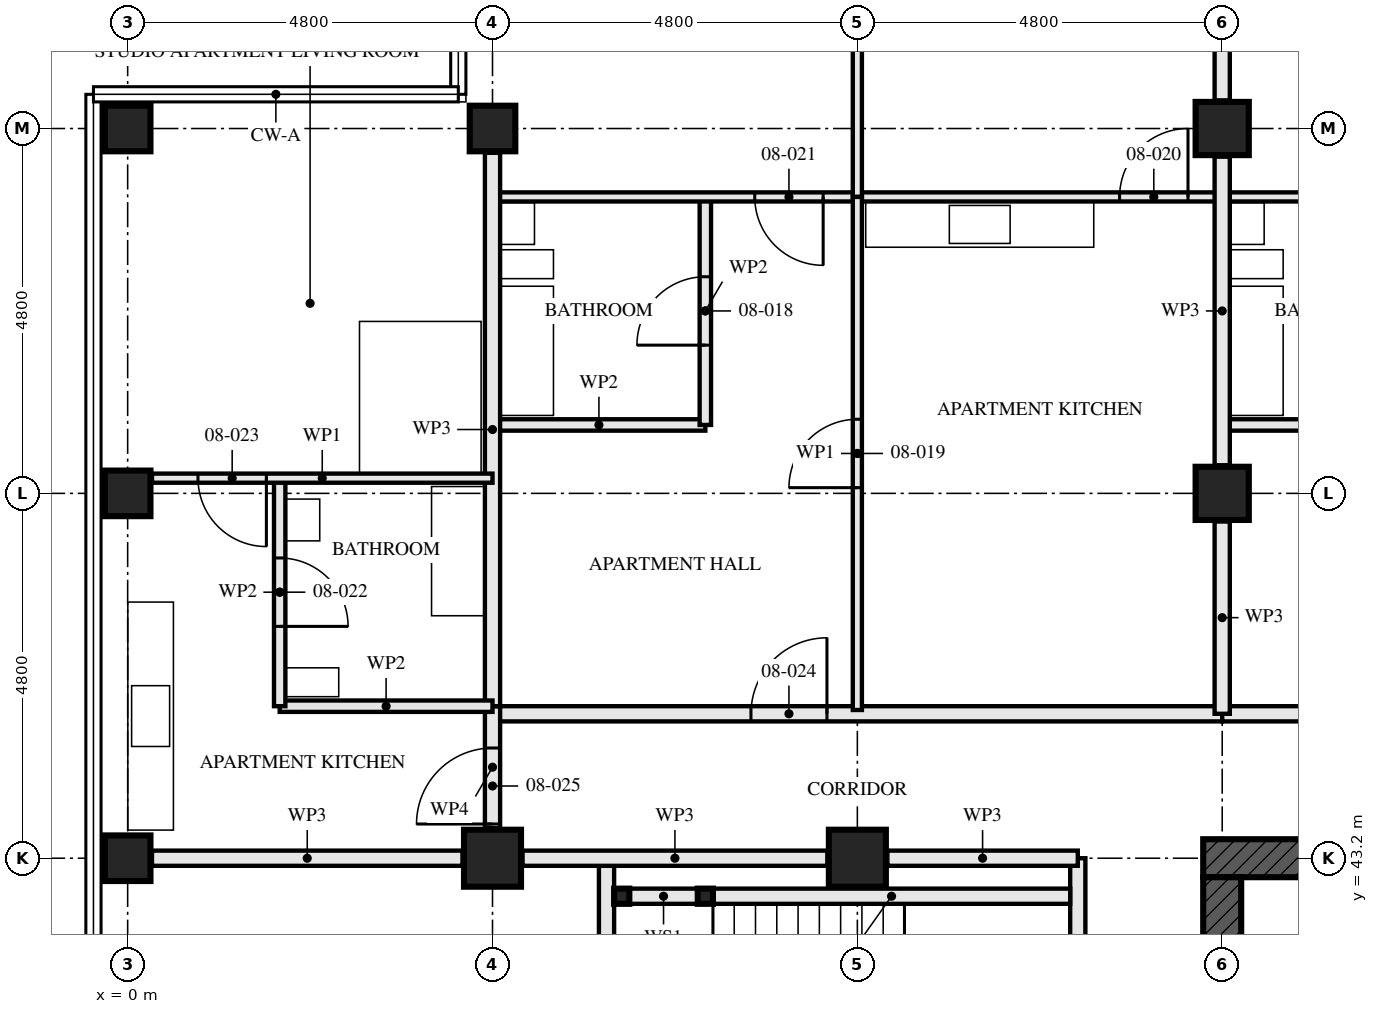
"""IFC4 building model, lengths in metres.
Left out: names, types, materials, properties, quantities, classifications, styles, units other than length and angle.
Written with IfcOpenShell. Run it as: python <this file> out.ifc"""

import sys

from ifc_helpers import new_model, si_unit, direction, frame, frame_2d, origin, origin_2d, place, context, subcontext, project, spatial, rectangle, hollow_rectangle, extrude, element, fill, save


model = new_model("IFC4")
c1 = context("Model", 3, precision=1e-05, world=origin(), true_north=direction((0.0, 1.0)))
c2 = subcontext(c1, "Body", "Model", "MODEL_VIEW")
j1 = project(units=[si_unit("LENGTHUNIT", "METRE"), si_unit("PLANEANGLEUNIT", "RADIAN")], contexts=[c1])
p1 = place(None, origin())
s1 = spatial("IfcSite", under=j1, at=p1, CompositionType="ELEMENT")
p2 = place(p1, origin())
s2 = spatial("IfcBuilding", under=s1, at=p2, CompositionType="ELEMENT")
p3 = place(p2, frame((0.0, 0.0, 34.0)))
s3 = spatial("IfcBuildingStorey", under=s2, at=p3, CompositionType="ELEMENT", Elevation=34.0)
for number, where, z_axis, x_axis in (
    (1, (0.0, 43.2, 0.0), (0.0, 0.0, 1.0), (0.0, 1.0, 0.0)),
    (2, (0.0, 48.0, 0.0), (0.0, 0.0, 1.0), (1.0, 0.0, 0.0)),
    (3, (0.0, 52.8, 0.0), (0.0, 0.0, 1.0), (0.0, 1.0, 0.0)),
):
    element("IfcColumn", number, at=place(p3, frame(where, z_axis=z_axis, x_axis=x_axis)), inside=s3, PredefinedType="COLUMN", context=c2, shape_type="SweptSolid", body=[
        extrude(hollow_rectangle(XDim=0.6, YDim=0.6, WallThickness=0.08, at=origin_2d()), origin(), (0.0, 0.0, 1.0), 3.5),
    ])
p4 = place(p3, frame((4.8, 43.2, 0.0), z_axis=(0.0, 0.0, 1.0), x_axis=(0.0, 1.0, 0.0)))
e4 = element("IfcColumn", 4, at=p4, inside=s3, PredefinedType="COLUMN", context=c2, shape_type="SweptSolid", body=[
    extrude(hollow_rectangle(XDim=0.75, YDim=0.75, WallThickness=0.08, at=origin_2d()), origin(), (0.0, 0.0, 1.0), 3.5),
])
p5 = place(p3, frame((4.8, 52.8, 0.0), z_axis=(0.0, 0.0, 1.0), x_axis=(0.0, 1.0, 0.0)))
e5 = element("IfcColumn", 5, at=p5, inside=s3, PredefinedType="COLUMN", context=c2, shape_type="SweptSolid", body=[
    extrude(hollow_rectangle(XDim=0.6, YDim=0.6, WallThickness=0.08, at=origin_2d()), origin(), (0.0, 0.0, 1.0), 3.5),
])
p6 = place(p3, frame((9.6, 43.2, 0.0), z_axis=(0.0, 0.0, 1.0), x_axis=(0.0, 1.0, 0.0)))
e6 = element("IfcColumn", 6, at=p6, inside=s3, PredefinedType="COLUMN", context=c2, shape_type="SweptSolid", body=[
    extrude(hollow_rectangle(XDim=0.75, YDim=0.75, WallThickness=0.08, at=origin_2d()), origin(), (0.0, 0.0, 1.0), 3.5),
])
for number, where, z_axis, x_axis in (
    (7, (14.4, 48.0, 0.0), (0.0, 0.0, 1.0), (1.0, 0.0, 0.0)),
    (8, (14.4, 52.8, 0.0), (0.0, 0.0, 1.0), (1.0, 0.0, 0.0)),
):
    element("IfcColumn", number, at=place(p3, frame(where, z_axis=z_axis, x_axis=x_axis)), inside=s3, PredefinedType="COLUMN", context=c2, shape_type="SweptSolid", body=[
        extrude(hollow_rectangle(XDim=0.7, YDim=0.7, WallThickness=0.06, at=origin_2d()), origin(), (0.0, 0.0, 1.0), 3.5),
    ])
p7 = place(p3, frame((29.05, 43.2, -0.17), z_axis=(0.0, 0.0, 1.0), x_axis=(-1.0, 0.0, 0.0)))
e9 = element("IfcWall", 9, at=p7, inside=s3, PredefinedType="SHEAR", context=c2, shape_type="SweptSolid", body=[
    extrude(rectangle(XDim=14.9, YDim=0.5, at=frame_2d((7.45, 0.0))), origin(), (0.0, 0.0, 1.0), 3.5),
])
p8 = place(p7, frame((6.85, 0.0, 0.17)))
e10 = element("IfcOpeningElement", 10, at=p8, cuts=e9, PredefinedType="OPENING", context=c2, shape_type="SweptSolid", body=[
    extrude(rectangle(XDim=1.2, YDim=2.1, at=frame_2d((0.6, 1.05))), frame((0.0, 0.26, 0.0), z_axis=(0.0, -1.0, 0.0), x_axis=(1.0, 0.0, 0.0)), (0.0, 0.0, 1.0), 0.521),
])
p9 = place(p3, frame((14.4, 42.95, -0.17), z_axis=(0.0, 0.0, 1.0), x_axis=(0.0, -1.0, 0.0)))
e11 = element("IfcWall", 11, at=p9, inside=s3, PredefinedType="SHEAR", context=c2, shape_type="SweptSolid", body=[
    extrude(rectangle(XDim=13.9, YDim=0.5, at=frame_2d((6.95, 0.0))), origin(), (0.0, 0.0, 1.0), 3.5),
])
p10 = place(p9, frame((6.35, 0.0, 0.17)))
e12 = element("IfcOpeningElement", 12, at=p10, cuts=e11, PredefinedType="OPENING", context=c2, shape_type="SweptSolid", body=[
    extrude(rectangle(XDim=1.2, YDim=2.1, at=frame_2d((0.6, 1.05))), frame((0.0, 0.26, 0.0), z_axis=(0.0, -1.0, 0.0), x_axis=(1.0, 0.0, 0.0)), (0.0, 0.0, 1.0), 0.521),
])
for number, where, z_axis, x_axis in (
    (13, (6.5, 42.7, 0.0), (0.0, 0.0, 1.0), (1.0, 0.0, 0.0)),
    (14, (7.6, 42.7, 0.0), (0.0, 0.0, 1.0), (1.0, 0.0, 0.0)),
):
    element("IfcColumn", number, at=place(p3, frame(where, z_axis=z_axis, x_axis=x_axis)), inside=s3, PredefinedType="COLUMN", context=c2, shape_type="SweptSolid", body=[
        extrude(hollow_rectangle(XDim=0.2, YDim=0.2, WallThickness=0.008, at=origin_2d()), origin(), (0.0, 0.0, 1.0), 3.33),
    ])
p11 = place(p3, frame((6.6, 42.7, 0.0), z_axis=(0.0, 0.0, 1.0), x_axis=(1.0, 0.0, 0.0)))
e15 = element("IfcWall", 15, at=p11, inside=s3, PredefinedType="SOLIDWALL", context=c2, shape_type="SweptSolid", body=[
    extrude(rectangle(XDim=0.9, YDim=0.2, at=frame_2d((0.45, 0.0))), origin(), (0.0, 0.0, 1.0), 2.99),
])
p12 = place(p3, frame((7.7, 42.7, 0.0), z_axis=(0.0, 0.0, 1.0), x_axis=(1.0, 0.0, 0.0)))
e16 = element("IfcWall", 16, at=p12, inside=s3, PredefinedType="SOLIDWALL", context=c2, shape_type="SweptSolid", body=[
    extrude(rectangle(XDim=4.7, YDim=0.2, at=frame_2d((2.35, 0.0))), origin(), (0.0, 0.0, 1.0), 2.99),
])
p13 = place(p3, frame((6.3, 43.1, 0.0), z_axis=(0.0, 0.0, 1.0), x_axis=(0.0, -1.0, 0.0)))
e17 = element("IfcWall", 17, at=p13, inside=s3, PredefinedType="SOLIDWALL", context=c2, shape_type="SweptSolid", body=[
    extrude(rectangle(XDim=3.3, YDim=0.2, at=frame_2d((1.65, 0.0))), origin(), (0.0, 0.0, 1.0), 3.33),
])
p14 = place(p3, frame((12.5, 43.2, 0.0), z_axis=(0.0, 0.0, 1.0), x_axis=(0.0, -1.0, 0.0)))
e18 = element("IfcWall", 18, at=p14, inside=s3, PredefinedType="PARTITIONING", context=c2, shape_type="SweptSolid", body=[
    extrude(rectangle(XDim=14.4, YDim=0.2, at=frame_2d((7.2, 0.0))), origin(), (0.0, 0.0, 1.0), 2.55),
])
p15 = place(p14, frame((1.4, 0.0, 0.0)))
e19 = element("IfcOpeningElement", 19, at=p15, cuts=e18, PredefinedType="OPENING", context=c2, shape_type="SweptSolid", body=[
    extrude(rectangle(XDim=1.0, YDim=2.1, at=frame_2d((0.5, 1.05))), frame((0.0, 0.111, 0.0), z_axis=(0.0, -1.0, 0.0), x_axis=(1.0, 0.0, 0.0)), (0.0, 0.0, 1.0), 0.221),
])
p16 = place(p14, frame((5.2, 0.0, 0.0)))
e20 = element("IfcOpeningElement", 20, at=p16, cuts=e18, PredefinedType="OPENING", context=c2, shape_type="SweptSolid", body=[
    extrude(rectangle(XDim=1.0, YDim=2.1, at=frame_2d((0.5, 1.05))), frame((0.0, 0.111, 0.0), z_axis=(0.0, -1.0, 0.0), x_axis=(1.0, 0.0, 0.0)), (0.0, 0.0, 1.0), 0.221),
])
p17 = place(p14, frame((10.0, 0.0, 0.0)))
e21 = element("IfcOpeningElement", 21, at=p17, cuts=e18, PredefinedType="OPENING", context=c2, shape_type="SweptSolid", body=[
    extrude(rectangle(XDim=1.0, YDim=2.1, at=frame_2d((0.5, 1.05))), frame((0.0, 0.111, 0.0), z_axis=(0.0, -1.0, 0.0), x_axis=(1.0, 0.0, 0.0)), (0.0, 0.0, 1.0), 0.221),
])
p18 = place(p3, frame((7.6, 51.9, 0.0), z_axis=(0.0, 0.0, 1.0), x_axis=(0.0, -1.0, 0.0)))
e22 = element("IfcWall", 22, at=p18, inside=s3, PredefinedType="PARTITIONING", context=c2, shape_type="SweptSolid", body=[
    extrude(rectangle(XDim=3.0, YDim=0.15, at=frame_2d((1.5, 0.0))), origin(), (0.0, 0.0, 1.0), 3.33),
])
p19 = place(p18, frame((1.05, 0.0, 0.0)))
e23 = element("IfcOpeningElement", 23, at=p19, cuts=e22, PredefinedType="OPENING", context=c2, shape_type="SweptSolid", body=[
    extrude(rectangle(XDim=0.9, YDim=2.1, at=frame_2d((0.45, 1.05))), frame((0.0, 0.085, 0.0), z_axis=(0.0, -1.0, 0.0), x_axis=(1.0, 0.0, 0.0)), (0.0, 0.0, 1.0), 0.171),
])
p20 = place(p3, frame((7.6, 48.9, 0.0), z_axis=(0.0, 0.0, 1.0), x_axis=(-1.0, 0.0, 0.0)))
e24 = element("IfcWall", 24, at=p20, inside=s3, PredefinedType="PARTITIONING", context=c2, shape_type="SweptSolid", body=[
    extrude(rectangle(XDim=2.8, YDim=0.15, at=frame_2d((1.4, 0.0))), origin(), (0.0, 0.0, 1.0), 3.33),
])
p21 = place(p3, frame((9.6, 51.9, 0.0), z_axis=(0.0, 0.0, 1.0), x_axis=(0.0, -1.0, 0.0)))
e25 = element("IfcWall", 25, at=p21, inside=s3, PredefinedType="PARTITIONING", context=c2, shape_type="SweptSolid", body=[
    extrude(rectangle(XDim=6.75, YDim=0.12, at=frame_2d((3.375, 0.0))), origin(), (0.0, 0.0, 1.0), 2.55),
])
p22 = place(p21, frame((2.925, 0.0, 0.0)))
e26 = element("IfcOpeningElement", 26, at=p22, cuts=e25, PredefinedType="OPENING", context=c2, shape_type="SweptSolid", body=[
    extrude(rectangle(XDim=0.9, YDim=2.1, at=frame_2d((0.45, 1.05))), frame((0.0, 0.071, 0.0), z_axis=(0.0, -1.0, 0.0), x_axis=(1.0, 0.0, 0.0)), (0.0, 0.0, 1.0), 0.141),
])
p23 = place(p3, frame((14.4, 51.9, 0.0), z_axis=(0.0, 0.0, 1.0), x_axis=(-1.0, 0.0, 0.0)))
e27 = element("IfcWall", 27, at=p23, inside=s3, PredefinedType="PARTITIONING", context=c2, shape_type="SweptSolid", body=[
    extrude(rectangle(XDim=4.8, YDim=0.12, at=frame_2d((2.4, 0.0))), origin(), (0.0, 0.0, 1.0), 3.33),
])
p24 = place(p23, frame((0.45, 0.0, 0.0)))
e28 = element("IfcOpeningElement", 28, at=p24, cuts=e27, PredefinedType="OPENING", context=c2, shape_type="SweptSolid", body=[
    extrude(rectangle(XDim=0.9, YDim=2.1, at=frame_2d((0.45, 1.05))), frame((0.0, 0.071, 0.0), z_axis=(0.0, -1.0, 0.0), x_axis=(1.0, 0.0, 0.0)), (0.0, 0.0, 1.0), 0.141),
])
p25 = place(p3, frame((9.6, 51.9, 0.0), z_axis=(0.0, 0.0, 1.0), x_axis=(-1.0, 0.0, 0.0)))
e29 = element("IfcWall", 29, at=p25, inside=s3, PredefinedType="PARTITIONING", context=c2, shape_type="SweptSolid", body=[
    extrude(rectangle(XDim=4.8, YDim=0.12, at=frame_2d((2.4, 0.0))), origin(), (0.0, 0.0, 1.0), 3.33),
])
p26 = place(p25, frame((0.45, 0.0, 0.0)))
e30 = element("IfcOpeningElement", 30, at=p26, cuts=e29, PredefinedType="OPENING", context=c2, shape_type="SweptSolid", body=[
    extrude(rectangle(XDim=0.9, YDim=2.1, at=frame_2d((0.45, 1.05))), frame((0.0, 0.071, 0.0), z_axis=(0.0, -1.0, 0.0), x_axis=(1.0, 0.0, 0.0)), (0.0, 0.0, 1.0), 0.141),
])
p27 = place(p3, frame((9.6, 57.28, 0.0), z_axis=(0.0, 0.0, 1.0), x_axis=(0.0, -1.0, 0.0)))
e31 = element("IfcWall", 31, at=p27, inside=s3, PredefinedType="PARTITIONING", context=c2, shape_type="SweptSolid", body=[
    extrude(rectangle(XDim=5.38, YDim=0.12, at=frame_2d((2.69, 0.0))), origin(), (0.0, 0.0, 1.0), 2.55),
])
p28 = place(p3, frame((4.8, 52.48, 0.0), z_axis=(0.0, 0.0, 1.0), x_axis=(0.0, -1.0, 0.0)))
e32 = element("IfcWall", 32, at=p28, inside=s3, PredefinedType="PARTITIONING", context=c2, shape_type="SweptSolid", body=[
    extrude(rectangle(XDim=7.28, YDim=0.2, at=frame_2d((3.64, 0.0))), origin(), (0.0, 0.0, 1.0), 2.55),
])
p29 = place(p3, frame((2.0, 48.2, 0.0), z_axis=(0.0, 0.0, 1.0), x_axis=(0.0, -1.0, 0.0)))
e33 = element("IfcWall", 33, at=p29, inside=s3, PredefinedType="PARTITIONING", context=c2, shape_type="SweptSolid", body=[
    extrude(rectangle(XDim=3.0, YDim=0.15, at=frame_2d((1.5, 0.0))), origin(), (0.0, 0.0, 1.0), 2.55),
])
p30 = place(p29, frame((1.05, 0.0, 0.0)))
e34 = element("IfcOpeningElement", 34, at=p30, cuts=e33, PredefinedType="OPENING", context=c2, shape_type="SweptSolid", body=[
    extrude(rectangle(XDim=0.9, YDim=2.1, at=frame_2d((0.45, 1.05))), frame((0.0, 0.085, 0.0), z_axis=(0.0, -1.0, 0.0), x_axis=(1.0, 0.0, 0.0)), (0.0, 0.0, 1.0), 0.171),
])
p31 = place(p3, frame((4.8, 45.2, 0.0), z_axis=(0.0, 0.0, 1.0), x_axis=(-1.0, 0.0, 0.0)))
e35 = element("IfcWall", 35, at=p31, inside=s3, PredefinedType="PARTITIONING", context=c2, shape_type="SweptSolid", body=[
    extrude(rectangle(XDim=2.8, YDim=0.15, at=frame_2d((1.4, 0.0))), origin(), (0.0, 0.0, 1.0), 3.33),
])
p32 = place(p3, frame((4.8, 48.2, 0.0), z_axis=(0.0, 0.0, 1.0), x_axis=(-1.0, 0.0, 0.0)))
e36 = element("IfcWall", 36, at=p32, inside=s3, PredefinedType="PARTITIONING", context=c2, shape_type="SweptSolid", body=[
    extrude(rectangle(XDim=4.48, YDim=0.12, at=frame_2d((2.24, 0.0))), origin(), (0.0, 0.0, 1.0), 3.33),
])
p33 = place(p32, frame((2.975, 0.0, 0.0)))
e37 = element("IfcOpeningElement", 37, at=p33, cuts=e36, PredefinedType="OPENING", context=c2, shape_type="SweptSolid", body=[
    extrude(rectangle(XDim=0.9, YDim=2.1, at=frame_2d((0.45, 1.05))), frame((0.0, 0.071, 0.0), z_axis=(0.0, -1.0, 0.0), x_axis=(1.0, 0.0, 0.0)), (0.0, 0.0, 1.0), 0.141),
])
p34 = place(p3, frame((14.4, 45.1, 0.0), z_axis=(0.0, 0.0, 1.0), x_axis=(-1.0, 0.0, 0.0)))
e38 = element("IfcWall", 38, at=p34, inside=s3, PredefinedType="PARTITIONING", context=c2, shape_type="SweptSolid", body=[
    extrude(rectangle(XDim=9.6, YDim=0.2, at=frame_2d((4.8, 0.0))), origin(), (0.0, 0.0, 1.0), 3.33),
])
p35 = place(p34, frame((5.2, 0.0, 0.0)))
e39 = element("IfcOpeningElement", 39, at=p35, cuts=e38, PredefinedType="OPENING", context=c2, shape_type="SweptSolid", body=[
    extrude(rectangle(XDim=1.0, YDim=2.1, at=frame_2d((0.5, 1.05))), frame((0.0, 0.111, 0.0), z_axis=(0.0, -1.0, 0.0), x_axis=(1.0, 0.0, 0.0)), (0.0, 0.0, 1.0), 0.221),
])
p36 = place(p3, frame((4.8, 45.2, 0.0), z_axis=(0.0, 0.0, 1.0), x_axis=(0.0, -1.0, 0.0)))
e40 = element("IfcWall", 40, at=p36, inside=s3, PredefinedType="PARTITIONING", context=c2, shape_type="SweptSolid", body=[
    extrude(rectangle(XDim=1.605, YDim=0.2, at=frame_2d((0.802, 0.0))), origin(), (0.0, 0.0, 1.0), 3.33),
])
p37 = place(p36, frame((0.55, 0.0, 0.0)))
e41 = element("IfcOpeningElement", 41, at=p37, cuts=e40, PredefinedType="OPENING", context=c2, shape_type="SweptSolid", body=[
    extrude(rectangle(XDim=1.0, YDim=2.1, at=frame_2d((0.5, 1.05))), frame((0.0, 0.111, 0.0), z_axis=(0.0, -1.0, 0.0), x_axis=(1.0, 0.0, 0.0)), (0.0, 0.0, 1.0), 0.221),
])
p38 = place(p3, frame((17.2, 48.9, 0.0), z_axis=(0.0, 0.0, 1.0), x_axis=(-1.0, 0.0, 0.0)))
e42 = element("IfcWall", 42, at=p38, inside=s3, PredefinedType="PARTITIONING", context=c2, shape_type="SweptSolid", body=[
    extrude(rectangle(XDim=2.8, YDim=0.15, at=frame_2d((1.4, 0.0))), origin(), (0.0, 0.0, 1.0), 3.33),
])
p39 = place(p3, frame((19.2, 51.9, 0.0), z_axis=(0.0, 0.0, 1.0), x_axis=(-1.0, 0.0, 0.0)))
e43 = element("IfcWall", 43, at=p39, inside=s3, PredefinedType="PARTITIONING", context=c2, shape_type="SweptSolid", body=[
    extrude(rectangle(XDim=4.8, YDim=0.12, at=frame_2d((2.4, 0.0))), origin(), (0.0, 0.0, 1.0), 3.33),
])
p40 = place(p39, frame((0.45, 0.0, 0.0)))
e44 = element("IfcOpeningElement", 44, at=p40, cuts=e43, PredefinedType="OPENING", context=c2, shape_type="SweptSolid", body=[
    extrude(rectangle(XDim=0.9, YDim=2.1, at=frame_2d((0.45, 1.05))), frame((0.0, 0.071, 0.0), z_axis=(0.0, -1.0, 0.0), x_axis=(1.0, 0.0, 0.0)), (0.0, 0.0, 1.0), 0.141),
])
p41 = place(p3, frame((28.8, 45.1, 0.0), z_axis=(0.0, 0.0, 1.0), x_axis=(-1.0, 0.0, 0.0)))
e45 = element("IfcWall", 45, at=p41, inside=s3, PredefinedType="PARTITIONING", context=c2, shape_type="SweptSolid", body=[
    extrude(rectangle(XDim=14.4, YDim=0.2, at=frame_2d((7.2, 0.0))), origin(), (0.0, 0.0, 1.0), 3.33),
])
p42 = place(p41, frame((5.2, 0.0, 0.0)))
e46 = element("IfcOpeningElement", 46, at=p42, cuts=e45, PredefinedType="OPENING", context=c2, shape_type="SweptSolid", body=[
    extrude(rectangle(XDim=1.0, YDim=2.1, at=frame_2d((0.5, 1.05))), frame((0.0, 0.111, 0.0), z_axis=(0.0, -1.0, 0.0), x_axis=(1.0, 0.0, 0.0)), (0.0, 0.0, 1.0), 0.221),
])
p43 = place(p41, frame((10.0, 0.0, 0.0)))
e47 = element("IfcOpeningElement", 47, at=p43, cuts=e45, PredefinedType="OPENING", context=c2, shape_type="SweptSolid", body=[
    extrude(rectangle(XDim=1.0, YDim=2.1, at=frame_2d((0.5, 1.05))), frame((0.0, 0.111, 0.0), z_axis=(0.0, -1.0, 0.0), x_axis=(1.0, 0.0, 0.0)), (0.0, 0.0, 1.0), 0.221),
])
p44 = place(p3, frame((12.5, 43.2, 0.0), z_axis=(0.0, 0.0, 1.0), x_axis=(-1.0, 0.0, 0.0)))
e48 = element("IfcWall", 48, at=p44, inside=s3, PredefinedType="PARTITIONING", context=c2, shape_type="SweptSolid", body=[
    extrude(rectangle(XDim=2.505, YDim=0.2, at=frame_2d((1.252, 0.0))), origin(), (0.0, 0.0, 1.0), 2.32),
])
p45 = place(p3, frame((9.205, 43.2, 0.0), z_axis=(0.0, 0.0, 1.0), x_axis=(-1.0, 0.0, 0.0)))
e49 = element("IfcWall", 49, at=p45, inside=s3, PredefinedType="PARTITIONING", context=c2, shape_type="SweptSolid", body=[
    extrude(rectangle(XDim=4.01, YDim=0.2, at=frame_2d((2.005, 0.0))), origin(), (0.0, 0.0, 1.0), 2.32),
])
p46 = place(p3, frame((4.405, 43.2, 0.0), z_axis=(0.0, 0.0, 1.0), x_axis=(-1.0, 0.0, 0.0)))
e50 = element("IfcWall", 50, at=p46, inside=s3, PredefinedType="PARTITIONING", context=c2, shape_type="SweptSolid", body=[
    extrude(rectangle(XDim=4.085, YDim=0.2, at=frame_2d((2.042, 0.0))), origin(), (0.0, 0.0, 1.0), 2.32),
])
p47 = place(p3, frame((14.4, 45.1, 0.0), z_axis=(0.0, 0.0, 1.0), x_axis=(0.0, 1.0, 0.0)))
e51 = element("IfcWall", 51, at=p47, inside=s3, PredefinedType="PARTITIONING", context=c2, shape_type="SweptSolid", body=[
    extrude(rectangle(XDim=2.53, YDim=0.2, at=frame_2d((1.265, 0.0))), origin(), (0.0, 0.0, 1.0), 2.32),
])
p48 = place(p3, frame((14.4, 48.37, 0.0), z_axis=(0.0, 0.0, 1.0), x_axis=(0.0, 1.0, 0.0)))
e52 = element("IfcWall", 52, at=p48, inside=s3, PredefinedType="PARTITIONING", context=c2, shape_type="SweptSolid", body=[
    extrude(rectangle(XDim=4.06, YDim=0.2, at=frame_2d((2.03, 0.0))), origin(), (0.0, 0.0, 1.0), 2.32),
])
p49 = place(p3, frame((14.4, 53.17, 0.0), z_axis=(0.0, 0.0, 1.0), x_axis=(0.0, 1.0, 0.0)))
e53 = element("IfcWall", 53, at=p49, inside=s3, PredefinedType="PARTITIONING", context=c2, shape_type="SweptSolid", body=[
    extrude(rectangle(XDim=4.11, YDim=0.2, at=frame_2d((2.055, 0.0))), origin(), (0.0, 0.0, 1.0), 2.32),
])
p50 = place(p19, frame((0.9, 0.0, 0.0), z_axis=(0.0, 0.0, 1.0), x_axis=(-1.0, 0.0, 0.0)))
e54 = element("IfcDoor", 54, at=p50, inside=s3, OperationType="SINGLE_SWING_RIGHT", PredefinedType="DOOR", context=c2, shape_type="SweptSolid", body=[
    extrude(rectangle(XDim=0.9, YDim=2.1, at=frame_2d((0.45, 1.05))), frame((0.0, 0.022, 0.0), z_axis=(0.0, -1.0, 0.0), x_axis=(1.0, 0.0, 0.0)), (0.0, 0.0, 1.0), 0.044),
])
fill(e23, e54)
p51 = place(p22, frame((0.9, 0.0, 0.0), z_axis=(0.0, 0.0, 1.0), x_axis=(-1.0, 0.0, 0.0)))
e55 = element("IfcDoor", 55, at=p51, inside=s3, OperationType="SINGLE_SWING_RIGHT", PredefinedType="DOOR", context=c2, shape_type="SweptSolid", body=[
    extrude(rectangle(XDim=0.9, YDim=2.1, at=frame_2d((0.45, 1.05))), frame((0.0, 0.022, 0.0), z_axis=(0.0, -1.0, 0.0), x_axis=(1.0, 0.0, 0.0)), (0.0, 0.0, 1.0), 0.044),
])
fill(e26, e55)
p52 = place(p24, frame((0.9, 0.0, 0.0), z_axis=(0.0, 0.0, 1.0), x_axis=(-1.0, 0.0, 0.0)))
e56 = element("IfcDoor", 56, at=p52, inside=s3, OperationType="SINGLE_SWING_LEFT", PredefinedType="DOOR", context=c2, shape_type="SweptSolid", body=[
    extrude(rectangle(XDim=0.9, YDim=2.1, at=frame_2d((0.45, 1.05))), frame((0.0, 0.022, 0.0), z_axis=(0.0, -1.0, 0.0), x_axis=(1.0, 0.0, 0.0)), (0.0, 0.0, 1.0), 0.044),
])
fill(e28, e56)
p53 = place(p26, origin())
e57 = element("IfcDoor", 57, at=p53, inside=s3, OperationType="SINGLE_SWING_RIGHT", PredefinedType="DOOR", context=c2, shape_type="SweptSolid", body=[
    extrude(rectangle(XDim=0.9, YDim=2.1, at=frame_2d((0.45, 1.05))), frame((0.0, 0.022, 0.0), z_axis=(0.0, -1.0, 0.0), x_axis=(1.0, 0.0, 0.0)), (0.0, 0.0, 1.0), 0.044),
])
fill(e30, e57)
p54 = place(p30, origin())
e58 = element("IfcDoor", 58, at=p54, inside=s3, OperationType="SINGLE_SWING_LEFT", PredefinedType="DOOR", context=c2, shape_type="SweptSolid", body=[
    extrude(rectangle(XDim=0.9, YDim=2.1, at=frame_2d((0.45, 1.05))), frame((0.0, 0.022, 0.0), z_axis=(0.0, -1.0, 0.0), x_axis=(1.0, 0.0, 0.0)), (0.0, 0.0, 1.0), 0.044),
])
fill(e34, e58)
p55 = place(p33, origin())
e59 = element("IfcDoor", 59, at=p55, inside=s3, OperationType="SINGLE_SWING_RIGHT", PredefinedType="DOOR", context=c2, shape_type="SweptSolid", body=[
    extrude(rectangle(XDim=0.9, YDim=2.1, at=frame_2d((0.45, 1.05))), frame((0.0, 0.022, 0.0), z_axis=(0.0, -1.0, 0.0), x_axis=(1.0, 0.0, 0.0)), (0.0, 0.0, 1.0), 0.044),
])
fill(e37, e59)
p56 = place(p35, frame((1.0, 0.0, 0.0), z_axis=(0.0, 0.0, 1.0), x_axis=(-1.0, 0.0, 0.0)))
e60 = element("IfcDoor", 60, at=p56, inside=s3, OperationType="SINGLE_SWING_LEFT", PredefinedType="DOOR", context=c2, shape_type="SweptSolid", body=[
    extrude(rectangle(XDim=1.0, YDim=2.1, at=frame_2d((0.5, 1.05))), frame((0.0, 0.027, 0.0), z_axis=(0.0, -1.0, 0.0), x_axis=(1.0, 0.0, 0.0)), (0.0, 0.0, 1.0), 0.054),
])
fill(e39, e60)
p57 = place(p37, frame((1.0, 0.0, 0.0), z_axis=(0.0, 0.0, 1.0), x_axis=(-1.0, 0.0, 0.0)))
e61 = element("IfcDoor", 61, at=p57, inside=s3, OperationType="SINGLE_SWING_RIGHT", PredefinedType="DOOR", context=c2, shape_type="SweptSolid", body=[
    extrude(rectangle(XDim=1.0, YDim=2.1, at=frame_2d((0.5, 1.05))), frame((0.0, 0.027, 0.0), z_axis=(0.0, -1.0, 0.0), x_axis=(1.0, 0.0, 0.0)), (0.0, 0.0, 1.0), 0.054),
])
fill(e41, e61)
save(model, sys.argv[1])
